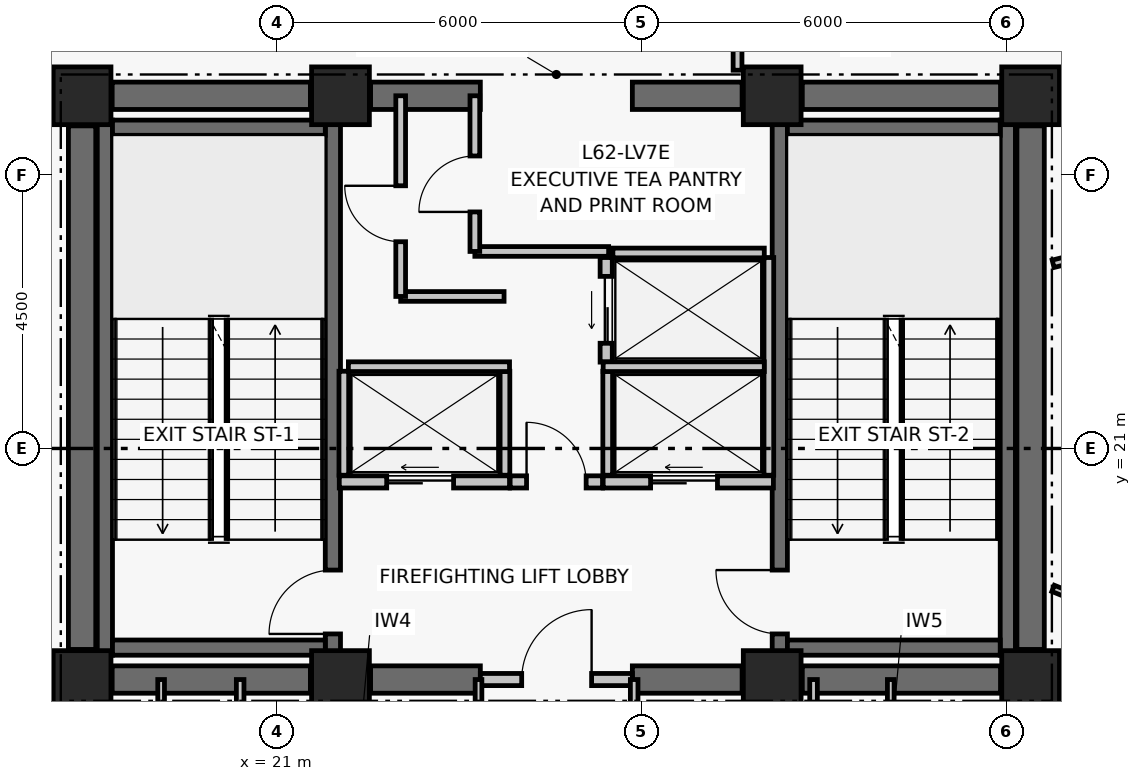
"""IFC4 building model, lengths in metres.
Left out: names, types, materials, properties, quantities, classifications, styles, units other than length and angle.
Written with IfcOpenShell. Run it as: python <this file> out.ifc"""

import sys

from ifc_helpers import new_model, si_unit, direction, frame, frame_2d, origin, origin_2d, place, context, subcontext, project, spatial, rectangle, extrude, element, fill, save


model = new_model("IFC4")
c1 = context("Model", 3, precision=1e-05, world=origin(), true_north=direction((0.0, 1.0)))
c2 = subcontext(c1, "Body", "Model", "MODEL_VIEW")
j1 = project(units=[si_unit("LENGTHUNIT", "METRE"), si_unit("PLANEANGLEUNIT", "RADIAN")], contexts=[c1])
p1 = place(None, origin())
s1 = spatial("IfcSite", under=j1, at=p1, CompositionType="ELEMENT")
p2 = place(p1, origin())
s2 = spatial("IfcBuilding", under=s1, at=p2, CompositionType="ELEMENT")
p3 = place(p2, frame((0.0, 0.0, 247.14)))
s3 = spatial("IfcBuildingStorey", under=s2, at=p3, CompositionType="ELEMENT", Elevation=247.14)
for number, where, z_axis, x_axis in (
    (1, (17.8, 17.2, 0.0), (0.0, 0.0, 1.0), (1.0, 0.0, 0.0)),
    (2, (22.05, 17.2, 0.0), (0.0, 0.0, 1.0), (1.0, 0.0, 0.0)),
    (3, (29.15, 17.2, 0.0), (0.0, 0.0, 1.0), (1.0, 0.0, 0.0)),
    (4, (33.4, 17.2, 0.0), (0.0, 0.0, 1.0), (1.0, 0.0, 0.0)),
    (5, (17.8, 26.8, 0.0), (0.0, 0.0, 1.0), (1.0, 0.0, 0.0)),
    (6, (22.05, 26.8, 0.0), (0.0, 0.0, 1.0), (1.0, 0.0, 0.0)),
    (7, (29.15, 26.8, 0.0), (0.0, 0.0, 1.0), (1.0, 0.0, 0.0)),
    (8, (33.4, 26.8, 0.0), (0.0, 0.0, 1.0), (1.0, 0.0, 0.0)),
):
    element("IfcColumn", number, at=place(p3, frame(where, z_axis=z_axis, x_axis=x_axis)), inside=s3, PredefinedType="COLUMN", context=c2, shape_type="SweptSolid", body=[
        extrude(rectangle(XDim=0.95, YDim=0.95, at=origin_2d()), origin(), (0.0, 0.0, 1.0), 3.72),
    ])
p4 = place(p3, frame((18.295, 17.2, 0.0), z_axis=(0.0, 0.0, 1.0), x_axis=(1.0, 0.0, 0.0)))
e9 = element("IfcWall", 9, at=p4, inside=s3, PredefinedType="SHEAR", context=c2, shape_type="SweptSolid", body=[
    extrude(rectangle(XDim=3.26, YDim=0.45, at=frame_2d((1.63, 0.0))), origin(), (0.0, 0.0, 1.0), 3.5),
])
p5 = place(p3, frame((22.545, 17.2, 0.0), z_axis=(0.0, 0.0, 1.0), x_axis=(1.0, 0.0, 0.0)))
e10 = element("IfcWall", 10, at=p5, inside=s3, PredefinedType="SHEAR", context=c2, shape_type="SweptSolid", body=[
    extrude(rectangle(XDim=1.805, YDim=0.45, at=frame_2d((0.903, 0.0))), origin(), (0.0, 0.0, 1.0), 3.5),
])
p6 = place(p3, frame((26.85, 17.2, 0.0), z_axis=(0.0, 0.0, 1.0), x_axis=(1.0, 0.0, 0.0)))
e11 = element("IfcWall", 11, at=p6, inside=s3, PredefinedType="SHEAR", context=c2, shape_type="SweptSolid", body=[
    extrude(rectangle(XDim=1.805, YDim=0.45, at=frame_2d((0.902, 0.0))), origin(), (0.0, 0.0, 1.0), 3.5),
])
for number, where, z_axis, x_axis in (
    (12, (29.645, 17.2, 0.0), (0.0, 0.0, 1.0), (1.0, 0.0, 0.0)),
    (13, (18.295, 26.8, 0.0), (0.0, 0.0, 1.0), (1.0, 0.0, 0.0)),
):
    element("IfcWall", number, at=place(p3, frame(where, z_axis=z_axis, x_axis=x_axis)), inside=s3, PredefinedType="SHEAR", context=c2, shape_type="SweptSolid", body=[
        extrude(rectangle(XDim=3.26, YDim=0.45, at=frame_2d((1.63, 0.0))), origin(), (0.0, 0.0, 1.0), 3.5),
    ])
p7 = place(p3, frame((22.545, 26.8, 0.0), z_axis=(0.0, 0.0, 1.0), x_axis=(1.0, 0.0, 0.0)))
e14 = element("IfcWall", 14, at=p7, inside=s3, PredefinedType="SHEAR", context=c2, shape_type="SweptSolid", body=[
    extrude(rectangle(XDim=1.805, YDim=0.45, at=frame_2d((0.903, 0.0))), origin(), (0.0, 0.0, 1.0), 3.5),
])
p8 = place(p3, frame((26.85, 26.8, 0.0), z_axis=(0.0, 0.0, 1.0), x_axis=(1.0, 0.0, 0.0)))
e15 = element("IfcWall", 15, at=p8, inside=s3, PredefinedType="SHEAR", context=c2, shape_type="SweptSolid", body=[
    extrude(rectangle(XDim=1.805, YDim=0.45, at=frame_2d((0.902, 0.0))), origin(), (0.0, 0.0, 1.0), 3.5),
])
p9 = place(p3, frame((29.645, 26.8, 0.0), z_axis=(0.0, 0.0, 1.0), x_axis=(1.0, 0.0, 0.0)))
e16 = element("IfcWall", 16, at=p9, inside=s3, PredefinedType="SHEAR", context=c2, shape_type="SweptSolid", body=[
    extrude(rectangle(XDim=3.26, YDim=0.45, at=frame_2d((1.63, 0.0))), origin(), (0.0, 0.0, 1.0), 3.5),
])
for number, where, z_axis, x_axis in (
    (17, (17.8, 17.695, 0.0), (0.0, 0.0, 1.0), (0.0, 1.0, 0.0)),
    (18, (33.4, 17.695, 0.0), (0.0, 0.0, 1.0), (0.0, 1.0, 0.0)),
):
    element("IfcWall", number, at=place(p3, frame(where, z_axis=z_axis, x_axis=x_axis)), inside=s3, PredefinedType="SHEAR", context=c2, shape_type="SweptSolid", body=[
        extrude(rectangle(XDim=8.61, YDim=0.45, at=frame_2d((4.305, 0.0))), origin(), (0.0, 0.0, 1.0), 3.5),
    ])
p10 = place(p3, frame((18.175, 17.6, 0.0), z_axis=(0.0, 0.0, 1.0), x_axis=(0.0, 1.0, 0.0)))
e19 = element("IfcWall", 19, at=p10, inside=s3, PredefinedType="SHEAR", context=c2, shape_type="SweptSolid", body=[
    extrude(rectangle(XDim=8.8, YDim=0.25, at=frame_2d((4.4, 0.0))), origin(), (0.0, 0.0, 1.0), 3.5),
])
p11 = place(p3, frame((21.925, 17.6, 0.0), z_axis=(0.0, 0.0, 1.0), x_axis=(0.0, 1.0, 0.0)))
e20 = element("IfcWall", 20, at=p11, inside=s3, PredefinedType="SHEAR", context=c2, shape_type="SweptSolid", body=[
    extrude(rectangle(XDim=8.8, YDim=0.25, at=frame_2d((4.4, 0.0))), origin(), (0.0, 0.0, 1.0), 3.5),
])
p12 = place(p11, frame((0.35, 0.0, 0.0)))
e21 = element("IfcOpeningElement", 21, at=p12, cuts=e20, PredefinedType="OPENING", context=c2, shape_type="SweptSolid", body=[
    extrude(rectangle(XDim=1.05, YDim=2.08, at=frame_2d((0.525, 1.04))), frame((0.0, 0.135, 0.0), z_axis=(0.0, -1.0, 0.0), x_axis=(1.0, 0.0, 0.0)), (0.0, 0.0, 1.0), 0.27),
])
for number, where, z_axis, x_axis in (
    (22, (18.3, 17.725, 0.0), (0.0, 0.0, 1.0), (1.0, 0.0, 0.0)),
    (23, (18.3, 26.275, 0.0), (0.0, 0.0, 1.0), (1.0, 0.0, 0.0)),
):
    element("IfcWall", number, at=place(p3, frame(where, z_axis=z_axis, x_axis=x_axis)), inside=s3, PredefinedType="SHEAR", context=c2, shape_type="SweptSolid", body=[
        extrude(rectangle(XDim=3.5, YDim=0.25, at=frame_2d((1.75, 0.0))), origin(), (0.0, 0.0, 1.0), 3.5),
    ])
p13 = place(p3, frame((29.275, 17.6, 0.0), z_axis=(0.0, 0.0, 1.0), x_axis=(0.0, 1.0, 0.0)))
e24 = element("IfcWall", 24, at=p13, inside=s3, PredefinedType="SHEAR", context=c2, shape_type="SweptSolid", body=[
    extrude(rectangle(XDim=8.8, YDim=0.25, at=frame_2d((4.4, 0.0))), origin(), (0.0, 0.0, 1.0), 3.5),
])
p14 = place(p13, frame((0.35, 0.0, 0.0)))
e25 = element("IfcOpeningElement", 25, at=p14, cuts=e24, PredefinedType="OPENING", context=c2, shape_type="SweptSolid", body=[
    extrude(rectangle(XDim=1.05, YDim=2.08, at=frame_2d((0.525, 1.04))), frame((0.0, 0.135, 0.0), z_axis=(0.0, -1.0, 0.0), x_axis=(1.0, 0.0, 0.0)), (0.0, 0.0, 1.0), 0.27),
])
p15 = place(p3, frame((33.025, 17.6, 0.0), z_axis=(0.0, 0.0, 1.0), x_axis=(0.0, 1.0, 0.0)))
e26 = element("IfcWall", 26, at=p15, inside=s3, PredefinedType="SHEAR", context=c2, shape_type="SweptSolid", body=[
    extrude(rectangle(XDim=8.8, YDim=0.25, at=frame_2d((4.4, 0.0))), origin(), (0.0, 0.0, 1.0), 3.5),
])
for number, where, z_axis, x_axis in (
    (27, (29.4, 17.725, 0.0), (0.0, 0.0, 1.0), (1.0, 0.0, 0.0)),
    (28, (29.4, 26.275, 0.0), (0.0, 0.0, 1.0), (1.0, 0.0, 0.0)),
):
    element("IfcWall", number, at=place(p3, frame(where, z_axis=z_axis, x_axis=x_axis)), inside=s3, PredefinedType="SHEAR", context=c2, shape_type="SweptSolid", body=[
        extrude(rectangle(XDim=3.5, YDim=0.25, at=frame_2d((1.75, 0.0))), origin(), (0.0, 0.0, 1.0), 3.5),
    ])
p16 = place(p3, frame((24.35, 17.2, 0.0), z_axis=(0.0, 0.0, 1.0), x_axis=(1.0, 0.0, 0.0)))
e29 = element("IfcWall", 29, at=p16, inside=s3, PredefinedType="PARTITIONING", context=c2, shape_type="SweptSolid", body=[
    extrude(rectangle(XDim=2.5, YDim=0.2, at=frame_2d((1.25, 0.0))), origin(), (0.0, 0.0, 1.0), 2.63),
])
p17 = place(p16, frame((0.68, 0.0, 0.0)))
e30 = element("IfcOpeningElement", 30, at=p17, cuts=e29, PredefinedType="OPENING", context=c2, shape_type="SweptSolid", body=[
    extrude(rectangle(XDim=1.15, YDim=2.08, at=frame_2d((0.575, 1.04))), frame((0.0, 0.11, 0.0), z_axis=(0.0, -1.0, 0.0), x_axis=(1.0, 0.0, 0.0)), (0.0, 0.0, 1.0), 0.22),
])
p18 = place(p3, frame((24.84, 20.45, 0.0), z_axis=(0.0, 0.0, 1.0), x_axis=(1.0, 0.0, 0.0)))
e31 = element("IfcWall", 31, at=p18, inside=s3, PredefinedType="PARTITIONING", context=c2, shape_type="SweptSolid", body=[
    extrude(rectangle(XDim=1.52, YDim=0.2, at=frame_2d((0.76, 0.0))), origin(), (0.0, 0.0, 1.0), 3.5),
])
p19 = place(p18, frame((0.27, 0.0, 0.0)))
e32 = element("IfcOpeningElement", 32, at=p19, cuts=e31, PredefinedType="OPENING", context=c2, shape_type="SweptSolid", body=[
    extrude(rectangle(XDim=0.98, YDim=2.06, at=frame_2d((0.49, 1.03))), frame((0.0, 0.11, 0.0), z_axis=(0.0, -1.0, 0.0), x_axis=(1.0, 0.0, 0.0)), (0.0, 0.0, 1.0), 0.22),
])
p20 = place(p3, frame((22.03, 20.45, 0.0), z_axis=(0.0, 0.0, 1.0), x_axis=(1.0, 0.0, 0.0)))
e33 = element("IfcWall", 33, at=p20, inside=s3, PredefinedType="PARTITIONING", context=c2, shape_type="SweptSolid", body=[
    extrude(rectangle(XDim=2.8, YDim=0.2, at=frame_2d((1.4, 0.0))), origin(), (0.0, 0.0, 1.0), 3.5),
])
p21 = place(p20, frame((0.78, 0.0, 0.0)))
e34 = element("IfcOpeningElement", 34, at=p21, cuts=e33, PredefinedType="OPENING", context=c2, shape_type="SweptSolid", body=[
    extrude(rectangle(XDim=1.1, YDim=2.08, at=frame_2d((0.55, 1.04))), frame((0.0, 0.11, 0.0), z_axis=(0.0, -1.0, 0.0), x_axis=(1.0, 0.0, 0.0)), (0.0, 0.0, 1.0), 0.22),
])
p22 = place(p3, frame((26.37, 20.45, 0.0), z_axis=(0.0, 0.0, 1.0), x_axis=(1.0, 0.0, 0.0)))
e35 = element("IfcWall", 35, at=p22, inside=s3, PredefinedType="PARTITIONING", context=c2, shape_type="SweptSolid", body=[
    extrude(rectangle(XDim=2.8, YDim=0.2, at=frame_2d((1.4, 0.0))), origin(), (0.0, 0.0, 1.0), 3.5),
])
p23 = place(p22, frame((0.78, 0.0, 0.0)))
e36 = element("IfcOpeningElement", 36, at=p23, cuts=e35, PredefinedType="OPENING", context=c2, shape_type="SweptSolid", body=[
    extrude(rectangle(XDim=1.1, YDim=2.08, at=frame_2d((0.55, 1.04))), frame((0.0, 0.11, 0.0), z_axis=(0.0, -1.0, 0.0), x_axis=(1.0, 0.0, 0.0)), (0.0, 0.0, 1.0), 0.22),
])
p24 = place(p3, frame((26.42, 22.42, 0.0), z_axis=(0.0, 0.0, 1.0), x_axis=(0.0, 1.0, 0.0)))
e37 = element("IfcWall", 37, at=p24, inside=s3, PredefinedType="PARTITIONING", context=c2, shape_type="SweptSolid", body=[
    extrude(rectangle(XDim=1.72, YDim=0.2, at=frame_2d((0.86, 0.0))), origin(), (0.0, 0.0, 1.0), 3.5),
])
p25 = place(p24, frame((0.31, 0.0, 0.0)))
e38 = element("IfcOpeningElement", 38, at=p25, cuts=e37, PredefinedType="OPENING", context=c2, shape_type="SweptSolid", body=[
    extrude(rectangle(XDim=1.1, YDim=2.08, at=frame_2d((0.55, 1.04))), frame((0.0, 0.11, 0.0), z_axis=(0.0, -1.0, 0.0), x_axis=(1.0, 0.0, 0.0)), (0.0, 0.0, 1.0), 0.22),
])
for number, where, z_axis, x_axis in (
    (39, (22.105, 20.56, 0.0), (0.0, 0.0, 1.0), (0.0, 1.0, 0.0)),
    (40, (24.755, 20.56, 0.0), (0.0, 0.0, 1.0), (0.0, 1.0, 0.0)),
):
    element("IfcWall", number, at=place(p3, frame(where, z_axis=z_axis, x_axis=x_axis)), inside=s3, PredefinedType="PARTITIONING", context=c2, shape_type="SweptSolid", body=[
        extrude(rectangle(XDim=1.71, YDim=0.16, at=frame_2d((0.855, 0.0))), origin(), (0.0, 0.0, 1.0), 3.5),
    ])
p26 = place(p3, frame((22.18, 22.345, 0.0), z_axis=(0.0, 0.0, 1.0), x_axis=(1.0, 0.0, 0.0)))
e41 = element("IfcWall", 41, at=p26, inside=s3, PredefinedType="PARTITIONING", context=c2, shape_type="SweptSolid", body=[
    extrude(rectangle(XDim=2.65, YDim=0.16, at=frame_2d((1.325, 0.0))), origin(), (0.0, 0.0, 1.0), 3.5),
])
p27 = place(p3, frame((29.095, 20.56, 0.0), z_axis=(0.0, 0.0, 1.0), x_axis=(0.0, 1.0, 0.0)))
e42 = element("IfcWall", 42, at=p27, inside=s3, PredefinedType="PARTITIONING", context=c2, shape_type="SweptSolid", body=[
    extrude(rectangle(XDim=3.58, YDim=0.16, at=frame_2d((1.79, 0.0))), origin(), (0.0, 0.0, 1.0), 3.5),
])
p28 = place(p3, frame((26.445, 20.56, 0.0), z_axis=(0.0, 0.0, 1.0), x_axis=(0.0, 1.0, 0.0)))
e43 = element("IfcWall", 43, at=p28, inside=s3, PredefinedType="PARTITIONING", context=c2, shape_type="SweptSolid", body=[
    extrude(rectangle(XDim=1.71, YDim=0.16, at=frame_2d((0.855, 0.0))), origin(), (0.0, 0.0, 1.0), 3.5),
])
p29 = place(p3, frame((26.37, 22.345, 0.0), z_axis=(0.0, 0.0, 1.0), x_axis=(1.0, 0.0, 0.0)))
e44 = element("IfcWall", 44, at=p29, inside=s3, PredefinedType="PARTITIONING", context=c2, shape_type="SweptSolid", body=[
    extrude(rectangle(XDim=2.65, YDim=0.16, at=frame_2d((1.325, 0.0))), origin(), (0.0, 0.0, 1.0), 3.5),
])
p30 = place(p3, frame((26.53, 24.215, 0.0), z_axis=(0.0, 0.0, 1.0), x_axis=(1.0, 0.0, 0.0)))
e45 = element("IfcWall", 45, at=p30, inside=s3, PredefinedType="PARTITIONING", context=c2, shape_type="SweptSolid", body=[
    extrude(rectangle(XDim=2.49, YDim=0.16, at=frame_2d((1.245, 0.0))), origin(), (0.0, 0.0, 1.0), 3.5),
])
p31 = place(p3, frame((23.04, 23.5, 0.0), z_axis=(0.0, 0.0, 1.0), x_axis=(1.0, 0.0, 0.0)))
e46 = element("IfcWall", 46, at=p31, inside=s3, PredefinedType="PARTITIONING", context=c2, shape_type="SweptSolid", body=[
    extrude(rectangle(XDim=1.7, YDim=0.16, at=frame_2d((0.85, 0.0))), origin(), (0.0, 0.0, 1.0), 3.5),
])
p32 = place(p3, frame((23.04, 23.5, 0.0), z_axis=(0.0, 0.0, 1.0), x_axis=(0.0, 1.0, 0.0)))
e47 = element("IfcWall", 47, at=p32, inside=s3, PredefinedType="PARTITIONING", context=c2, shape_type="SweptSolid", body=[
    extrude(rectangle(XDim=3.3, YDim=0.16, at=frame_2d((1.65, 0.0))), origin(), (0.0, 0.0, 1.0), 2.63),
])
p33 = place(p32, frame((0.9, 0.0, 0.0)))
e48 = element("IfcOpeningElement", 48, at=p33, cuts=e47, PredefinedType="OPENING", context=c2, shape_type="SweptSolid", body=[
    extrude(rectangle(XDim=0.92, YDim=2.05, at=frame_2d((0.46, 1.025))), frame((0.0, 0.09, 0.0), z_axis=(0.0, -1.0, 0.0), x_axis=(1.0, 0.0, 0.0)), (0.0, 0.0, 1.0), 0.18),
])
p34 = place(p3, frame((24.26, 24.24, 0.0), z_axis=(0.0, 0.0, 1.0), x_axis=(1.0, 0.0, 0.0)))
e49 = element("IfcWall", 49, at=p34, inside=s3, PredefinedType="PARTITIONING", context=c2, shape_type="SweptSolid", body=[
    extrude(rectangle(XDim=2.2, YDim=0.16, at=frame_2d((1.1, 0.0))), origin(), (0.0, 0.0, 1.0), 3.5),
])
p35 = place(p3, frame((24.26, 24.24, 0.0), z_axis=(0.0, 0.0, 1.0), x_axis=(0.0, 1.0, 0.0)))
e50 = element("IfcWall", 50, at=p35, inside=s3, PredefinedType="PARTITIONING", context=c2, shape_type="SweptSolid", body=[
    extrude(rectangle(XDim=2.56, YDim=0.16, at=frame_2d((1.28, 0.0))), origin(), (0.0, 0.0, 1.0), 2.63),
])
p36 = place(p35, frame((0.65, 0.0, 0.0)))
e51 = element("IfcOpeningElement", 51, at=p36, cuts=e50, PredefinedType="OPENING", context=c2, shape_type="SweptSolid", body=[
    extrude(rectangle(XDim=0.92, YDim=2.05, at=frame_2d((0.46, 1.025))), frame((0.0, 0.09, 0.0), z_axis=(0.0, -1.0, 0.0), x_axis=(1.0, 0.0, 0.0)), (0.0, 0.0, 1.0), 0.18),
])
p37 = place(p3, frame((19.1, 14.95, 0.0), z_axis=(0.0, 0.0, 1.0), x_axis=(0.0, 1.0, 0.0)))
e52 = element("IfcWall", 52, at=p37, inside=s3, PredefinedType="PARTITIONING", context=c2, shape_type="SweptSolid", body=[
    extrude(rectangle(XDim=2.25, YDim=0.11, at=frame_2d((1.125, 0.0))), origin(), (0.0, 0.0, 1.0), 2.63),
])
for number, where, z_axis, x_axis in (
    (53, (20.4, 14.95, 0.0), (0.0, 0.0, 1.0), (0.0, 1.0, 0.0)),
    (54, (22.36, 14.95, 0.0), (0.0, 0.0, 1.0), (0.0, 1.0, 0.0)),
):
    element("IfcWall", number, at=place(p3, frame(where, z_axis=z_axis, x_axis=x_axis)), inside=s3, PredefinedType="PARTITIONING", context=c2, shape_type="SweptSolid", body=[
        extrude(rectangle(XDim=2.25, YDim=0.125, at=frame_2d((1.125, 0.0))), origin(), (0.0, 0.0, 1.0), 2.63),
    ])
p38 = place(p3, frame((24.32, 14.95, 0.0), z_axis=(0.0, 0.0, 1.0), x_axis=(0.0, 1.0, 0.0)))
e55 = element("IfcWall", 55, at=p38, inside=s3, PredefinedType="PARTITIONING", context=c2, shape_type="SweptSolid", body=[
    extrude(rectangle(XDim=2.25, YDim=0.11, at=frame_2d((1.125, 0.0))), origin(), (0.0, 0.0, 1.0), 2.63),
])
for number, where, z_axis, x_axis in (
    (56, (26.88, 14.95, 0.0), (0.0, 0.0, 1.0), (0.0, 1.0, 0.0)),
    (57, (29.83, 14.95, 0.0), (0.0, 0.0, 1.0), (0.0, 1.0, 0.0)),
):
    element("IfcWall", number, at=place(p3, frame(where, z_axis=z_axis, x_axis=x_axis)), inside=s3, PredefinedType="PARTITIONING", context=c2, shape_type="SweptSolid", body=[
        extrude(rectangle(XDim=2.25, YDim=0.125, at=frame_2d((1.125, 0.0))), origin(), (0.0, 0.0, 1.0), 2.63),
    ])
p39 = place(p3, frame((31.1, 14.95, 0.0), z_axis=(0.0, 0.0, 1.0), x_axis=(0.0, 1.0, 0.0)))
e58 = element("IfcWall", 58, at=p39, inside=s3, PredefinedType="PARTITIONING", context=c2, shape_type="SweptSolid", body=[
    extrude(rectangle(XDim=2.25, YDim=0.11, at=frame_2d((1.125, 0.0))), origin(), (0.0, 0.0, 1.0), 2.63),
])
p40 = place(p3, frame((28.58, 27.22, 0.0), z_axis=(0.0, 0.0, 1.0), x_axis=(0.0, 1.0, 0.0)))
e59 = element("IfcWall", 59, at=p40, inside=s3, PredefinedType="PARTITIONING", context=c2, shape_type="SweptSolid", body=[
    extrude(rectangle(XDim=1.48, YDim=0.145, at=frame_2d((0.74, 0.0))), origin(), (0.0, 0.0, 1.0), 2.63),
])
p41 = place(p3, frame((33.77, 24.037, 0.0), z_axis=(0.0, 0.0, 1.0), x_axis=(0.970305215228, 0.241883834312, 0.0)))
e60 = element("IfcWall", 60, at=p41, inside=s3, PredefinedType="PARTITIONING", context=c2, shape_type="SweptSolid", body=[
    extrude(rectangle(XDim=4.319, YDim=0.125, at=frame_2d((2.159, 0.0))), origin(), (0.0, 0.0, 1.0), 2.63),
])
p42 = place(p41, frame((3.119, 0.0, 0.0)))
e61 = element("IfcOpeningElement", 61, at=p42, cuts=e60, PredefinedType="OPENING", context=c2, shape_type="SweptSolid", body=[
    extrude(rectangle(XDim=0.92, YDim=2.05, at=frame_2d((0.46, 1.025))), frame((0.0, 0.073, 0.0), z_axis=(0.0, -1.0, 0.0), x_axis=(1.0, 0.0, 0.0)), (0.0, 0.0, 1.0), 0.145),
])
p43 = place(p3, frame((33.77, 18.699, 0.0), z_axis=(0.0, 0.0, 1.0), x_axis=(0.92715823081, -0.374670008197, 0.0)))
e62 = element("IfcWall", 62, at=p43, inside=s3, PredefinedType="PARTITIONING", context=c2, shape_type="SweptSolid", body=[
    extrude(rectangle(XDim=2.848, YDim=0.11, at=frame_2d((1.424, 0.0))), origin(), (0.0, 0.0, 1.0), 2.63),
])
p44 = place(p12, origin())
e63 = element("IfcDoor", 63, at=p44, inside=s3, OperationType="SINGLE_SWING_LEFT", PredefinedType="DOOR", context=c2, shape_type="SweptSolid", body=[
    extrude(rectangle(XDim=1.05, YDim=2.08, at=frame_2d((0.525, 1.04))), frame((0.0, 0.025, 0.0), z_axis=(0.0, -1.0, 0.0), x_axis=(1.0, 0.0, 0.0)), (0.0, 0.0, 1.0), 0.05),
])
fill(e21, e63)
p45 = place(p14, origin())
e64 = element("IfcDoor", 64, at=p45, inside=s3, OperationType="SINGLE_SWING_RIGHT", PredefinedType="DOOR", context=c2, shape_type="SweptSolid", body=[
    extrude(rectangle(XDim=1.05, YDim=2.08, at=frame_2d((0.525, 1.04))), frame((0.0, 0.025, 0.0), z_axis=(0.0, -1.0, 0.0), x_axis=(1.0, 0.0, 0.0)), (0.0, 0.0, 1.0), 0.05),
])
fill(e25, e64)
p46 = place(p17, origin())
e65 = element("IfcDoor", 65, at=p46, inside=s3, OperationType="SINGLE_SWING_RIGHT", PredefinedType="DOOR", context=c2, shape_type="SweptSolid", body=[
    extrude(rectangle(XDim=1.15, YDim=2.08, at=frame_2d((0.575, 1.04))), frame((0.0, 0.025, 0.0), z_axis=(0.0, -1.0, 0.0), x_axis=(1.0, 0.0, 0.0)), (0.0, 0.0, 1.0), 0.05),
])
fill(e30, e65)
p47 = place(p19, origin())
e66 = element("IfcDoor", 66, at=p47, inside=s3, OperationType="SINGLE_SWING_LEFT", PredefinedType="DOOR", context=c2, shape_type="SweptSolid", body=[
    extrude(rectangle(XDim=0.98, YDim=2.06, at=frame_2d((0.49, 1.03))), frame((0.0, 0.025, 0.0), z_axis=(0.0, -1.0, 0.0), x_axis=(1.0, 0.0, 0.0)), (0.0, 0.0, 1.0), 0.05),
])
fill(e32, e66)
p48 = place(p21, origin())
e67 = element("IfcDoor", 67, at=p48, inside=s3, OperationType="DOUBLE_DOOR_SLIDING", PredefinedType="DOOR", context=c2, shape_type="SweptSolid", body=[
    extrude(rectangle(XDim=1.1, YDim=2.08, at=frame_2d((0.55, 1.04))), frame((0.0, 0.025, 0.0), z_axis=(0.0, -1.0, 0.0), x_axis=(1.0, 0.0, 0.0)), (0.0, 0.0, 1.0), 0.05),
])
fill(e34, e67)
p49 = place(p23, origin())
e68 = element("IfcDoor", 68, at=p49, inside=s3, OperationType="DOUBLE_DOOR_SLIDING", PredefinedType="DOOR", context=c2, shape_type="SweptSolid", body=[
    extrude(rectangle(XDim=1.1, YDim=2.08, at=frame_2d((0.55, 1.04))), frame((0.0, 0.025, 0.0), z_axis=(0.0, -1.0, 0.0), x_axis=(1.0, 0.0, 0.0)), (0.0, 0.0, 1.0), 0.05),
])
fill(e36, e68)
p50 = place(p25, origin())
e69 = element("IfcDoor", 69, at=p50, inside=s3, OperationType="DOUBLE_DOOR_SLIDING", PredefinedType="DOOR", context=c2, shape_type="SweptSolid", body=[
    extrude(rectangle(XDim=1.1, YDim=2.08, at=frame_2d((0.55, 1.04))), frame((0.0, 0.025, 0.0), z_axis=(0.0, -1.0, 0.0), x_axis=(1.0, 0.0, 0.0)), (0.0, 0.0, 1.0), 0.05),
])
fill(e38, e69)
p51 = place(p33, origin())
e70 = element("IfcDoor", 70, at=p51, inside=s3, OperationType="SINGLE_SWING_RIGHT", PredefinedType="DOOR", context=c2, shape_type="SweptSolid", body=[
    extrude(rectangle(XDim=0.92, YDim=2.05, at=frame_2d((0.46, 1.025))), frame((0.0, 0.025, 0.0), z_axis=(0.0, -1.0, 0.0), x_axis=(1.0, 0.0, 0.0)), (0.0, 0.0, 1.0), 0.05),
])
fill(e48, e70)
p52 = place(p36, origin())
e71 = element("IfcDoor", 71, at=p52, inside=s3, OperationType="SINGLE_SWING_LEFT", PredefinedType="DOOR", context=c2, shape_type="SweptSolid", body=[
    extrude(rectangle(XDim=0.92, YDim=2.05, at=frame_2d((0.46, 1.025))), frame((0.0, 0.025, 0.0), z_axis=(0.0, -1.0, 0.0), x_axis=(1.0, 0.0, 0.0)), (0.0, 0.0, 1.0), 0.05),
])
fill(e51, e71)
save(model, sys.argv[1])
